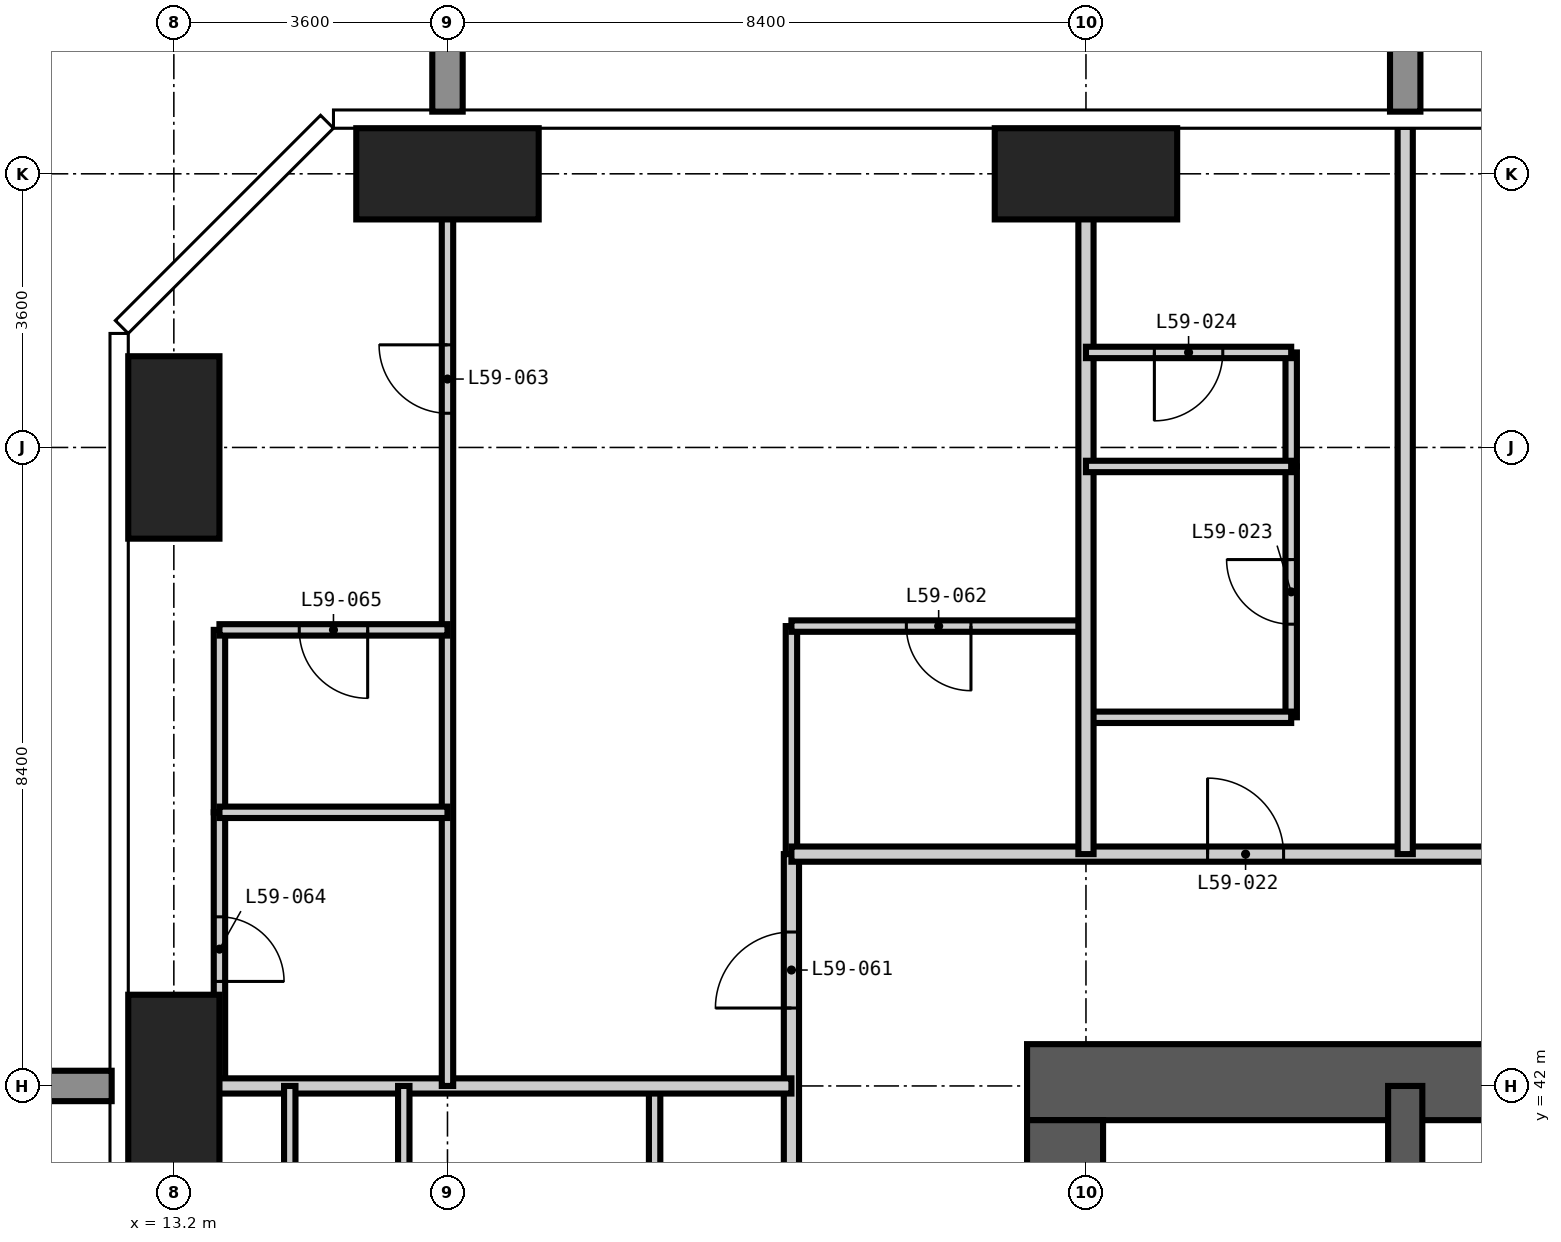
"""IFC4 building model, lengths in metres.
Left out: names, types, materials, properties, quantities, classifications, styles, units other than length and angle.
Written with IfcOpenShell. Run it as: python <this file> out.ifc"""

import sys

from ifc_helpers import new_model, si_unit, direction, frame, frame_2d, origin, origin_2d, place, context, subcontext, project, spatial, rectangle, extrude, element, fill, save


model = new_model("IFC4")
c1 = context("Model", 3, precision=1e-05, world=origin(), true_north=direction((0.0, 1.0)))
c2 = subcontext(c1, "Body", "Model", "MODEL_VIEW")
j1 = project(units=[si_unit("LENGTHUNIT", "METRE"), si_unit("PLANEANGLEUNIT", "RADIAN")], contexts=[c1])
p1 = place(None, origin())
s1 = spatial("IfcSite", under=j1, at=p1, CompositionType="ELEMENT")
p2 = place(p1, origin())
s2 = spatial("IfcBuilding", under=s1, at=p2, CompositionType="ELEMENT")
p3 = place(p2, frame((0.0, 0.0, 229.5)))
s3 = spatial("IfcBuildingStorey", under=s2, at=p3, CompositionType="ELEMENT", Elevation=229.5)
for number, where, z_axis, x_axis in (
    (1, (13.2, 42.0, -0.35), (0.0, 0.0, 1.0), (1.0, 0.0, 0.0)),
    (2, (13.2, 50.4, -0.35), (0.0, 0.0, 1.0), (1.0, 0.0, 0.0)),
):
    element("IfcColumn", number, at=place(p3, frame(where, z_axis=z_axis, x_axis=x_axis)), inside=s3, PredefinedType="COLUMN", context=c2, shape_type="SweptSolid", body=[
        extrude(rectangle(XDim=1.2, YDim=2.4, at=origin_2d()), origin(), (0.0, 0.0, 1.0), 3.9),
    ])
for number, where, z_axis, x_axis in (
    (3, (16.8, 54.0, -0.35), (0.0, 0.0, 1.0), (1.0, 0.0, 0.0)),
    (4, (25.2, 54.0, -0.35), (0.0, 0.0, 1.0), (1.0, 0.0, 0.0)),
):
    element("IfcColumn", number, at=place(p3, frame(where, z_axis=z_axis, x_axis=x_axis)), inside=s3, PredefinedType="COLUMN", context=c2, shape_type="SweptSolid", body=[
        extrude(rectangle(XDim=2.4, YDim=1.2, at=origin_2d()), origin(), (0.0, 0.0, 1.0), 3.9),
    ])
p4 = place(p3, frame((42.55, 42.05, -0.35), z_axis=(0.0, 0.0, 1.0), x_axis=(-1.0, 0.0, 0.0)))
e5 = element("IfcWall", 5, at=p4, inside=s3, PredefinedType="SHEAR", context=c2, shape_type="SweptSolid", body=[
    extrude(rectangle(XDim=18.125, YDim=1.0, at=frame_2d((9.062, 0.0))), origin(), (0.0, 0.0, 1.0), 3.9),
])
p5 = place(p4, frame((10.45, 0.0, 0.35)))
e6 = element("IfcOpeningElement", 6, at=p5, cuts=e5, PredefinedType="OPENING", context=c2, shape_type="SweptSolid", body=[
    extrude(rectangle(XDim=1.2, YDim=2.2, at=frame_2d((0.6, 1.1))), frame((0.0, 0.51, 0.0), z_axis=(0.0, -1.0, 0.0), x_axis=(1.0, 0.0, 0.0)), (0.0, 0.0, 1.0), 1.02),
])
p6 = place(p3, frame((24.925, 41.55, -0.35), z_axis=(0.0, 0.0, 1.0), x_axis=(0.0, -1.0, 0.0)))
e7 = element("IfcWall", 7, at=p6, inside=s3, PredefinedType="SHEAR", context=c2, shape_type="SweptSolid", body=[
    extrude(rectangle(XDim=24.3, YDim=1.0, at=frame_2d((12.15, 0.0))), origin(), (0.0, 0.0, 1.0), 3.9),
])
p7 = place(p6, frame((11.65, 0.0, 0.35)))
e8 = element("IfcOpeningElement", 8, at=p7, cuts=e7, PredefinedType="OPENING", context=c2, shape_type="SweptSolid", body=[
    extrude(rectangle(XDim=1.0, YDim=2.1, at=frame_2d((0.5, 1.05))), frame((0.0, 0.51, 0.0), z_axis=(0.0, -1.0, 0.0), x_axis=(1.0, 0.0, 0.0)), (0.0, 0.0, 1.0), 1.02),
])
p8 = place(p3, frame((29.4, 33.6, -0.35), z_axis=(0.0, 0.0, 1.0), x_axis=(0.0, 1.0, 0.0)))
e9 = element("IfcWall", 9, at=p8, inside=s3, PredefinedType="SHEAR", context=c2, shape_type="SweptSolid", body=[
    extrude(rectangle(XDim=8.4, YDim=0.45, at=frame_2d((4.2, 0.0))), origin(), (0.0, 0.0, 1.0), 3.9),
])
p9 = place(p8, frame((0.525, 0.0, 0.35)))
e10 = element("IfcOpeningElement", 10, at=p9, cuts=e9, PredefinedType="OPENING", context=c2, shape_type="SweptSolid", body=[
    extrude(rectangle(XDim=1.2, YDim=2.2, at=frame_2d((0.6, 1.1))), frame((0.0, 0.235, 0.0), z_axis=(0.0, -1.0, 0.0), x_axis=(1.0, 0.0, 0.0)), (0.0, 0.0, 1.0), 0.47),
])
p10 = place(p3, frame((13.8, 42.0, 0.0), z_axis=(0.0, 0.0, 1.0), x_axis=(0.0, 1.0, 0.0)))
e11 = element("IfcWall", 11, at=p10, inside=s3, PredefinedType="PARTITIONING", context=c2, shape_type="SweptSolid", body=[
    extrude(rectangle(XDim=3.6, YDim=0.15, at=frame_2d((1.8, 0.0))), origin(), (0.0, 0.0, 1.0), 3.55),
])
p11 = place(p10, frame((1.375, 0.0, 0.0)))
e12 = element("IfcOpeningElement", 12, at=p11, cuts=e11, PredefinedType="OPENING", context=c2, shape_type="SweptSolid", body=[
    extrude(rectangle(XDim=0.85, YDim=2.1, at=frame_2d((0.425, 1.05))), frame((0.0, 0.085, 0.0), z_axis=(0.0, -1.0, 0.0), x_axis=(1.0, 0.0, 0.0)), (0.0, 0.0, 1.0), 0.17),
])
p12 = place(p3, frame((19.525, 39.3, 0.0), z_axis=(0.0, 0.0, 1.0), x_axis=(0.0, 1.0, 0.0)))
e13 = element("IfcWall", 13, at=p12, inside=s3, PredefinedType="PARTITIONING", context=c2, shape_type="SweptSolid", body=[
    extrude(rectangle(XDim=2.7, YDim=0.15, at=frame_2d((1.35, 0.0))), origin(), (0.0, 0.0, 1.0), 3.55),
])
p13 = place(p3, frame((21.325, 45.05, 0.0), z_axis=(0.0, 0.0, 1.0), x_axis=(0.0, 1.0, 0.0)))
e14 = element("IfcWall", 14, at=p13, inside=s3, PredefinedType="PARTITIONING", context=c2, shape_type="SweptSolid", body=[
    extrude(rectangle(XDim=3.0, YDim=0.15, at=frame_2d((1.5, 0.0))), origin(), (0.0, 0.0, 1.0), 3.55),
])
p14 = place(p3, frame((27.9, 46.85, 0.0), z_axis=(0.0, 0.0, 1.0), x_axis=(0.0, 1.0, 0.0)))
e15 = element("IfcWall", 15, at=p14, inside=s3, PredefinedType="PARTITIONING", context=c2, shape_type="SweptSolid", body=[
    extrude(rectangle(XDim=3.3, YDim=0.15, at=frame_2d((1.65, 0.0))), origin(), (0.0, 0.0, 1.0), 3.55),
])
p15 = place(p14, frame((1.225, 0.0, 0.0)))
e16 = element("IfcOpeningElement", 16, at=p15, cuts=e15, PredefinedType="OPENING", context=c2, shape_type="SweptSolid", body=[
    extrude(rectangle(XDim=0.85, YDim=2.1, at=frame_2d((0.425, 1.05))), frame((0.0, 0.085, 0.0), z_axis=(0.0, -1.0, 0.0), x_axis=(1.0, 0.0, 0.0)), (0.0, 0.0, 1.0), 0.17),
])
p16 = place(p3, frame((25.2, 46.85, 0.0), z_axis=(0.0, 0.0, 1.0), x_axis=(1.0, 0.0, 0.0)))
e17 = element("IfcWall", 17, at=p16, inside=s3, PredefinedType="PARTITIONING", context=c2, shape_type="SweptSolid", body=[
    extrude(rectangle(XDim=2.7, YDim=0.15, at=frame_2d((1.35, 0.0))), origin(), (0.0, 0.0, 1.0), 3.55),
])
p17 = place(p3, frame((21.325, 48.05, 0.0), z_axis=(0.0, 0.0, 1.0), x_axis=(1.0, 0.0, 0.0)))
e18 = element("IfcWall", 18, at=p17, inside=s3, PredefinedType="PARTITIONING", context=c2, shape_type="SweptSolid", body=[
    extrude(rectangle(XDim=3.875, YDim=0.15, at=frame_2d((1.938, 0.0))), origin(), (0.0, 0.0, 1.0), 3.55),
])
p18 = place(p17, frame((1.512, 0.0, 0.0)))
e19 = element("IfcOpeningElement", 19, at=p18, cuts=e18, PredefinedType="OPENING", context=c2, shape_type="SweptSolid", body=[
    extrude(rectangle(XDim=0.85, YDim=2.1, at=frame_2d((0.425, 1.05))), frame((0.0, 0.085, 0.0), z_axis=(0.0, -1.0, 0.0), x_axis=(1.0, 0.0, 0.0)), (0.0, 0.0, 1.0), 0.17),
])
p19 = place(p3, frame((21.325, 13.15, 0.0), z_axis=(0.0, 0.0, 1.0), x_axis=(0.0, 1.0, 0.0)))
e20 = element("IfcWall", 20, at=p19, inside=s3, PredefinedType="PARTITIONING", context=c2, shape_type="SweptSolid", body=[
    extrude(rectangle(XDim=31.9, YDim=0.2, at=frame_2d((15.95, 0.0))), origin(), (0.0, 0.0, 1.0), 3.55),
])
p20 = place(p19, frame((6.15, 0.0, 0.0)))
e21 = element("IfcOpeningElement", 21, at=p20, cuts=e20, PredefinedType="OPENING", context=c2, shape_type="SweptSolid", body=[
    extrude(rectangle(XDim=1.0, YDim=2.2, at=frame_2d((0.5, 1.1))), frame((0.0, 0.11, 0.0), z_axis=(0.0, -1.0, 0.0), x_axis=(1.0, 0.0, 0.0)), (0.0, 0.0, 1.0), 0.22),
])
p21 = place(p19, frame((16.95, 0.0, 0.0)))
e22 = element("IfcOpeningElement", 22, at=p21, cuts=e20, PredefinedType="OPENING", context=c2, shape_type="SweptSolid", body=[
    extrude(rectangle(XDim=1.0, YDim=2.2, at=frame_2d((0.5, 1.1))), frame((0.0, 0.11, 0.0), z_axis=(0.0, -1.0, 0.0), x_axis=(1.0, 0.0, 0.0)), (0.0, 0.0, 1.0), 0.22),
])
p22 = place(p19, frame((22.95, 0.0, 0.0)))
e23 = element("IfcOpeningElement", 23, at=p22, cuts=e20, PredefinedType="OPENING", context=c2, shape_type="SweptSolid", body=[
    extrude(rectangle(XDim=1.0, YDim=2.2, at=frame_2d((0.5, 1.1))), frame((0.0, 0.11, 0.0), z_axis=(0.0, -1.0, 0.0), x_axis=(1.0, 0.0, 0.0)), (0.0, 0.0, 1.0), 0.22),
])
p23 = place(p19, frame((1.325, 0.0, 0.0)))
e24 = element("IfcOpeningElement", 24, at=p23, cuts=e20, PredefinedType="OPENING", context=c2, shape_type="SweptSolid", body=[
    extrude(rectangle(XDim=1.0, YDim=2.2, at=frame_2d((0.5, 1.1))), frame((0.0, 0.11, 0.0), z_axis=(0.0, -1.0, 0.0), x_axis=(1.0, 0.0, 0.0)), (0.0, 0.0, 1.0), 0.22),
])
p24 = place(p19, frame((29.875, 0.0, 0.0)))
e25 = element("IfcOpeningElement", 25, at=p24, cuts=e20, PredefinedType="OPENING", context=c2, shape_type="SweptSolid", body=[
    extrude(rectangle(XDim=1.0, YDim=2.2, at=frame_2d((0.5, 1.1))), frame((0.0, 0.11, 0.0), z_axis=(0.0, -1.0, 0.0), x_axis=(1.0, 0.0, 0.0)), (0.0, 0.0, 1.0), 0.22),
])
p25 = place(p3, frame((21.325, 45.05, 0.0), z_axis=(0.0, 0.0, 1.0), x_axis=(1.0, 0.0, 0.0)))
e26 = element("IfcWall", 26, at=p25, inside=s3, PredefinedType="PARTITIONING", context=c2, shape_type="SweptSolid", body=[
    extrude(rectangle(XDim=23.125, YDim=0.2, at=frame_2d((11.562, 0.0))), origin(), (0.0, 0.0, 1.0), 3.55),
])
p26 = place(p25, frame((5.475, 0.0, 0.0)))
e27 = element("IfcOpeningElement", 27, at=p26, cuts=e26, PredefinedType="OPENING", context=c2, shape_type="SweptSolid", body=[
    extrude(rectangle(XDim=1.0, YDim=2.2, at=frame_2d((0.5, 1.1))), frame((0.0, 0.11, 0.0), z_axis=(0.0, -1.0, 0.0), x_axis=(1.0, 0.0, 0.0)), (0.0, 0.0, 1.0), 0.22),
])
p27 = place(p25, frame((11.775, 0.0, 0.0)))
e28 = element("IfcOpeningElement", 28, at=p27, cuts=e26, PredefinedType="OPENING", context=c2, shape_type="SweptSolid", body=[
    extrude(rectangle(XDim=1.0, YDim=2.2, at=frame_2d((0.5, 1.1))), frame((0.0, 0.11, 0.0), z_axis=(0.0, -1.0, 0.0), x_axis=(1.0, 0.0, 0.0)), (0.0, 0.0, 1.0), 0.22),
])
p28 = place(p25, frame((18.075, 0.0, 0.0)))
e29 = element("IfcOpeningElement", 29, at=p28, cuts=e26, PredefinedType="OPENING", context=c2, shape_type="SweptSolid", body=[
    extrude(rectangle(XDim=1.0, YDim=2.2, at=frame_2d((0.5, 1.1))), frame((0.0, 0.11, 0.0), z_axis=(0.0, -1.0, 0.0), x_axis=(1.0, 0.0, 0.0)), (0.0, 0.0, 1.0), 0.22),
])
for number, where, z_axis, x_axis in (
    (30, (25.2, 45.05, 0.0), (0.0, 0.0, 1.0), (0.0, 1.0, 0.0)),
    (31, (29.4, 45.05, 0.0), (0.0, 0.0, 1.0), (0.0, 1.0, 0.0)),
):
    element("IfcWall", number, at=place(p3, frame(where, z_axis=z_axis, x_axis=x_axis)), inside=s3, PredefinedType="PARTITIONING", context=c2, shape_type="SweptSolid", body=[
        extrude(rectangle(XDim=9.568, YDim=0.2, at=frame_2d((4.784, 0.0))), origin(), (0.0, 0.0, 1.0), 3.55),
    ])
p29 = place(p3, frame((12.582, 42.0, 0.0), z_axis=(0.0, 0.0, 1.0), x_axis=(1.0, 0.0, 0.0)))
e32 = element("IfcWall", 32, at=p29, inside=s3, PredefinedType="PARTITIONING", context=c2, shape_type="SweptSolid", body=[
    extrude(rectangle(XDim=8.743, YDim=0.2, at=frame_2d((4.372, 0.0))), origin(), (0.0, 0.0, 1.0), 3.55),
])
p30 = place(p3, frame((13.8, 45.6, 0.0), z_axis=(0.0, 0.0, 1.0), x_axis=(0.0, 1.0, 0.0)))
e33 = element("IfcWall", 33, at=p30, inside=s3, PredefinedType="PARTITIONING", context=c2, shape_type="SweptSolid", body=[
    extrude(rectangle(XDim=2.4, YDim=0.15, at=frame_2d((1.2, 0.0))), origin(), (0.0, 0.0, 1.0), 3.55),
])
p31 = place(p3, frame((14.725, 39.3, 0.0), z_axis=(0.0, 0.0, 1.0), x_axis=(0.0, 1.0, 0.0)))
e34 = element("IfcWall", 34, at=p31, inside=s3, PredefinedType="PARTITIONING", context=c2, shape_type="SweptSolid", body=[
    extrude(rectangle(XDim=2.7, YDim=0.15, at=frame_2d((1.35, 0.0))), origin(), (0.0, 0.0, 1.0), 3.55),
])
p32 = place(p31, frame((0.5, 0.0, 0.0)))
e35 = element("IfcOpeningElement", 35, at=p32, cuts=e34, PredefinedType="OPENING", context=c2, shape_type="SweptSolid", body=[
    extrude(rectangle(XDim=0.9, YDim=2.1, at=frame_2d((0.45, 1.05))), frame((0.0, 0.085, 0.0), z_axis=(0.0, -1.0, 0.0), x_axis=(1.0, 0.0, 0.0)), (0.0, 0.0, 1.0), 0.17),
])
p33 = place(p3, frame((16.225, 39.3, 0.0), z_axis=(0.0, 0.0, 1.0), x_axis=(0.0, 1.0, 0.0)))
e36 = element("IfcWall", 36, at=p33, inside=s3, PredefinedType="PARTITIONING", context=c2, shape_type="SweptSolid", body=[
    extrude(rectangle(XDim=2.7, YDim=0.15, at=frame_2d((1.35, 0.0))), origin(), (0.0, 0.0, 1.0), 3.55),
])
p34 = place(p3, frame((16.8, 42.0, 0.0), z_axis=(0.0, 0.0, 1.0), x_axis=(0.0, 1.0, 0.0)))
e37 = element("IfcWall", 37, at=p34, inside=s3, PredefinedType="PARTITIONING", context=c2, shape_type="SweptSolid", body=[
    extrude(rectangle(XDim=12.618, YDim=0.15, at=frame_2d((6.309, 0.0))), origin(), (0.0, 0.0, 1.0), 3.55),
])
p35 = place(p34, frame((8.85, 0.0, 0.0)))
e38 = element("IfcOpeningElement", 38, at=p35, cuts=e37, PredefinedType="OPENING", context=c2, shape_type="SweptSolid", body=[
    extrude(rectangle(XDim=0.9, YDim=2.1, at=frame_2d((0.45, 1.05))), frame((0.0, 0.085, 0.0), z_axis=(0.0, -1.0, 0.0), x_axis=(1.0, 0.0, 0.0)), (0.0, 0.0, 1.0), 0.17),
])
p36 = place(p3, frame((27.9, 50.15, 0.0), z_axis=(0.0, 0.0, 1.0), x_axis=(0.0, 1.0, 0.0)))
e39 = element("IfcWall", 39, at=p36, inside=s3, PredefinedType="PARTITIONING", context=c2, shape_type="SweptSolid", body=[
    extrude(rectangle(XDim=1.5, YDim=0.15, at=frame_2d((0.75, 0.0))), origin(), (0.0, 0.0, 1.0), 3.55),
])
p37 = place(p3, frame((13.8, 45.6, 0.0), z_axis=(0.0, 0.0, 1.0), x_axis=(1.0, 0.0, 0.0)))
e40 = element("IfcWall", 40, at=p37, inside=s3, PredefinedType="PARTITIONING", context=c2, shape_type="SweptSolid", body=[
    extrude(rectangle(XDim=3.0, YDim=0.15, at=frame_2d((1.5, 0.0))), origin(), (0.0, 0.0, 1.0), 3.55),
])
p38 = place(p3, frame((13.8, 48.0, 0.0), z_axis=(0.0, 0.0, 1.0), x_axis=(1.0, 0.0, 0.0)))
e41 = element("IfcWall", 41, at=p38, inside=s3, PredefinedType="PARTITIONING", context=c2, shape_type="SweptSolid", body=[
    extrude(rectangle(XDim=3.0, YDim=0.15, at=frame_2d((1.5, 0.0))), origin(), (0.0, 0.0, 1.0), 3.55),
])
p39 = place(p38, frame((1.05, 0.0, 0.0)))
e42 = element("IfcOpeningElement", 42, at=p39, cuts=e41, PredefinedType="OPENING", context=c2, shape_type="SweptSolid", body=[
    extrude(rectangle(XDim=0.9, YDim=2.1, at=frame_2d((0.45, 1.05))), frame((0.0, 0.085, 0.0), z_axis=(0.0, -1.0, 0.0), x_axis=(1.0, 0.0, 0.0)), (0.0, 0.0, 1.0), 0.17),
])
p40 = place(p3, frame((25.2, 50.15, 0.0), z_axis=(0.0, 0.0, 1.0), x_axis=(1.0, 0.0, 0.0)))
e43 = element("IfcWall", 43, at=p40, inside=s3, PredefinedType="PARTITIONING", context=c2, shape_type="SweptSolid", body=[
    extrude(rectangle(XDim=2.7, YDim=0.15, at=frame_2d((1.35, 0.0))), origin(), (0.0, 0.0, 1.0), 3.55),
])
p41 = place(p3, frame((25.2, 51.65, 0.0), z_axis=(0.0, 0.0, 1.0), x_axis=(1.0, 0.0, 0.0)))
e44 = element("IfcWall", 44, at=p41, inside=s3, PredefinedType="PARTITIONING", context=c2, shape_type="SweptSolid", body=[
    extrude(rectangle(XDim=2.7, YDim=0.15, at=frame_2d((1.35, 0.0))), origin(), (0.0, 0.0, 1.0), 3.55),
])
p42 = place(p41, frame((0.9, 0.0, 0.0)))
e45 = element("IfcOpeningElement", 45, at=p42, cuts=e44, PredefinedType="OPENING", context=c2, shape_type="SweptSolid", body=[
    extrude(rectangle(XDim=0.9, YDim=2.1, at=frame_2d((0.45, 1.05))), frame((0.0, 0.085, 0.0), z_axis=(0.0, -1.0, 0.0), x_axis=(1.0, 0.0, 0.0)), (0.0, 0.0, 1.0), 0.17),
])
p43 = place(p26, origin())
e46 = element("IfcDoor", 46, at=p43, inside=s3, OperationType="SINGLE_SWING_LEFT", PredefinedType="DOOR", context=c2, shape_type="SweptSolid", body=[
    extrude(rectangle(XDim=1.0, YDim=2.2, at=frame_2d((0.5, 1.1))), frame((0.0, 0.025, 0.0), z_axis=(0.0, -1.0, 0.0), x_axis=(1.0, 0.0, 0.0)), (0.0, 0.0, 1.0), 0.05),
])
fill(e27, e46)
p44 = place(p15, origin())
e47 = element("IfcDoor", 47, at=p44, inside=s3, OperationType="SINGLE_SWING_RIGHT", PredefinedType="DOOR", context=c2, shape_type="SweptSolid", body=[
    extrude(rectangle(XDim=0.85, YDim=2.1, at=frame_2d((0.425, 1.05))), frame((0.0, 0.025, 0.0), z_axis=(0.0, -1.0, 0.0), x_axis=(1.0, 0.0, 0.0)), (0.0, 0.0, 1.0), 0.05),
])
fill(e16, e47)
p45 = place(p42, frame((0.9, 0.0, 0.0), z_axis=(0.0, 0.0, 1.0), x_axis=(-1.0, 0.0, 0.0)))
e48 = element("IfcDoor", 48, at=p45, inside=s3, OperationType="SINGLE_SWING_RIGHT", PredefinedType="DOOR", context=c2, shape_type="SweptSolid", body=[
    extrude(rectangle(XDim=0.9, YDim=2.1, at=frame_2d((0.45, 1.05))), frame((0.0, 0.025, 0.0), z_axis=(0.0, -1.0, 0.0), x_axis=(1.0, 0.0, 0.0)), (0.0, 0.0, 1.0), 0.05),
])
fill(e45, e48)
p46 = place(p24, origin())
e49 = element("IfcDoor", 49, at=p46, inside=s3, OperationType="SINGLE_SWING_LEFT", PredefinedType="DOOR", context=c2, shape_type="SweptSolid", body=[
    extrude(rectangle(XDim=1.0, YDim=2.2, at=frame_2d((0.5, 1.1))), frame((0.0, 0.025, 0.0), z_axis=(0.0, -1.0, 0.0), x_axis=(1.0, 0.0, 0.0)), (0.0, 0.0, 1.0), 0.05),
])
fill(e25, e49)
p47 = place(p18, frame((0.85, 0.0, 0.0), z_axis=(0.0, 0.0, 1.0), x_axis=(-1.0, 0.0, 0.0)))
e50 = element("IfcDoor", 50, at=p47, inside=s3, OperationType="SINGLE_SWING_LEFT", PredefinedType="DOOR", context=c2, shape_type="SweptSolid", body=[
    extrude(rectangle(XDim=0.85, YDim=2.1, at=frame_2d((0.425, 1.05))), frame((0.0, 0.025, 0.0), z_axis=(0.0, -1.0, 0.0), x_axis=(1.0, 0.0, 0.0)), (0.0, 0.0, 1.0), 0.05),
])
fill(e19, e50)
p48 = place(p35, origin())
e51 = element("IfcDoor", 51, at=p48, inside=s3, OperationType="SINGLE_SWING_RIGHT", PredefinedType="DOOR", context=c2, shape_type="SweptSolid", body=[
    extrude(rectangle(XDim=0.9, YDim=2.1, at=frame_2d((0.45, 1.05))), frame((0.0, 0.025, 0.0), z_axis=(0.0, -1.0, 0.0), x_axis=(1.0, 0.0, 0.0)), (0.0, 0.0, 1.0), 0.05),
])
fill(e38, e51)
p49 = place(p11, frame((0.85, 0.0, 0.0), z_axis=(0.0, 0.0, 1.0), x_axis=(-1.0, 0.0, 0.0)))
e52 = element("IfcDoor", 52, at=p49, inside=s3, OperationType="SINGLE_SWING_RIGHT", PredefinedType="DOOR", context=c2, shape_type="SweptSolid", body=[
    extrude(rectangle(XDim=0.85, YDim=2.1, at=frame_2d((0.425, 1.05))), frame((0.0, 0.025, 0.0), z_axis=(0.0, -1.0, 0.0), x_axis=(1.0, 0.0, 0.0)), (0.0, 0.0, 1.0), 0.05),
])
fill(e12, e52)
p50 = place(p39, frame((0.9, 0.0, 0.0), z_axis=(0.0, 0.0, 1.0), x_axis=(-1.0, 0.0, 0.0)))
e53 = element("IfcDoor", 53, at=p50, inside=s3, OperationType="SINGLE_SWING_LEFT", PredefinedType="DOOR", context=c2, shape_type="SweptSolid", body=[
    extrude(rectangle(XDim=0.9, YDim=2.1, at=frame_2d((0.45, 1.05))), frame((0.0, 0.025, 0.0), z_axis=(0.0, -1.0, 0.0), x_axis=(1.0, 0.0, 0.0)), (0.0, 0.0, 1.0), 0.05),
])
fill(e42, e53)
save(model, sys.argv[1])
